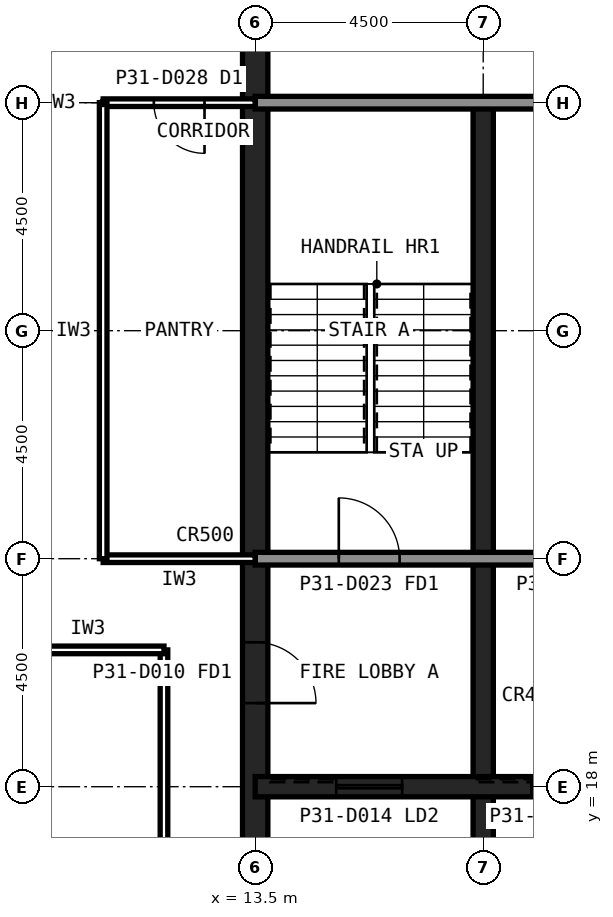
"""IFC4 building model, lengths in metres.
Left out: names, types, materials, properties, quantities, classifications, styles, units other than length and angle.
Written with IfcOpenShell. Run it as: python <this file> out.ifc"""

import sys

from ifc_helpers import new_model, si_unit, direction, frame, frame_2d, origin, place, context, subcontext, project, spatial, rectangle, extrude, element, fill, save


model = new_model("IFC4")
c1 = context("Model", 3, precision=1e-05, world=origin(), true_north=direction((0.0, 1.0)))
c2 = subcontext(c1, "Body", "Model", "MODEL_VIEW")
j1 = project(units=[si_unit("LENGTHUNIT", "METRE"), si_unit("PLANEANGLEUNIT", "RADIAN")], contexts=[c1])
p1 = place(None, origin())
s1 = spatial("IfcSite", under=j1, at=p1, CompositionType="ELEMENT")
p2 = place(p1, origin())
s2 = spatial("IfcBuilding", under=s1, at=p2, CompositionType="ELEMENT")
p3 = place(p2, frame((0.0, 0.0, 135.6)))
s3 = spatial("IfcBuildingStorey", under=s2, at=p3, CompositionType="ELEMENT", Elevation=135.6)
p4 = place(p3, frame((13.5, 40.5, 0.0), z_axis=(0.0, 0.0, 1.0), x_axis=(0.0, -1.0, 0.0)))
e1 = element("IfcWall", 1, at=p4, inside=s3, PredefinedType="SHEAR", context=c2, shape_type="SweptSolid", body=[
    extrude(rectangle(XDim=27.0, YDim=0.5, at=frame_2d((13.5, 0.0))), origin(), (0.0, 0.0, 1.0), 4.0),
])
p5 = place(p4, frame((19.65, 0.0, 0.0)))
e2 = element("IfcOpeningElement", 2, at=p5, cuts=e1, PredefinedType="OPENING", context=c2, shape_type="SweptSolid", body=[
    extrude(rectangle(XDim=1.2, YDim=2.1, at=frame_2d((0.6, 1.05))), frame((0.0, 0.26, 0.0), z_axis=(0.0, -1.0, 0.0), x_axis=(1.0, 0.0, 0.0)), (0.0, 0.0, 1.0), 0.52),
])
p6 = place(p4, frame((5.85, 0.0, 0.0)))
e3 = element("IfcOpeningElement", 3, at=p6, cuts=e1, PredefinedType="OPENING", context=c2, shape_type="SweptSolid", body=[
    extrude(rectangle(XDim=1.8, YDim=2.1, at=frame_2d((0.9, 1.05))), frame((0.0, 0.26, 0.0), z_axis=(0.0, -1.0, 0.0), x_axis=(1.0, 0.0, 0.0)), (0.0, 0.0, 1.0), 0.52),
])
p7 = place(p3, frame((18.0, 13.5, 0.0), z_axis=(0.0, 0.0, 1.0), x_axis=(0.0, 1.0, 0.0)))
e4 = element("IfcWall", 4, at=p7, inside=s3, PredefinedType="SHEAR", context=c2, shape_type="SweptSolid", body=[
    extrude(rectangle(XDim=18.0, YDim=0.4, at=frame_2d((9.0, 0.0))), origin(), (0.0, 0.0, 1.0), 4.0),
])
p8 = place(p3, frame((13.5, 18.0, 0.0), z_axis=(0.0, 0.0, 1.0), x_axis=(1.0, 0.0, 0.0)))
e5 = element("IfcWall", 5, at=p8, inside=s3, PredefinedType="SHEAR", context=c2, shape_type="SweptSolid", body=[
    extrude(rectangle(XDim=27.0, YDim=0.4, at=frame_2d((13.5, 0.0))), origin(), (0.0, 0.0, 1.0), 4.0),
])
p9 = place(p8, frame((24.3, 0.0, 0.0)))
e6 = element("IfcOpeningElement", 6, at=p9, cuts=e5, PredefinedType="OPENING", context=c2, shape_type="SweptSolid", body=[
    extrude(rectangle(XDim=0.9, YDim=2.1, at=frame_2d((0.45, 1.05))), frame((0.0, 0.21, 0.0), z_axis=(0.0, -1.0, 0.0), x_axis=(1.0, 0.0, 0.0)), (0.0, 0.0, 1.0), 0.42),
])
p10 = place(p8, frame((5.45, 0.0, 0.0)))
e7 = element("IfcOpeningElement", 7, at=p10, cuts=e5, PredefinedType="OPENING", context=c2, shape_type="SweptSolid", body=[
    extrude(rectangle(XDim=1.1, YDim=2.1, at=frame_2d((0.55, 1.05))), frame((0.0, 0.21, 0.0), z_axis=(0.0, -1.0, 0.0), x_axis=(1.0, 0.0, 0.0)), (0.0, 0.0, 1.0), 0.42),
])
p11 = place(p8, frame((8.45, 0.0, 0.0)))
e8 = element("IfcOpeningElement", 8, at=p11, cuts=e5, PredefinedType="OPENING", context=c2, shape_type="SweptSolid", body=[
    extrude(rectangle(XDim=1.1, YDim=2.1, at=frame_2d((0.55, 1.05))), frame((0.0, 0.21, 0.0), z_axis=(0.0, -1.0, 0.0), x_axis=(1.0, 0.0, 0.0)), (0.0, 0.0, 1.0), 0.42),
])
p12 = place(p8, frame((11.45, 0.0, 0.0)))
e9 = element("IfcOpeningElement", 9, at=p12, cuts=e5, PredefinedType="OPENING", context=c2, shape_type="SweptSolid", body=[
    extrude(rectangle(XDim=1.1, YDim=2.1, at=frame_2d((0.55, 1.05))), frame((0.0, 0.21, 0.0), z_axis=(0.0, -1.0, 0.0), x_axis=(1.0, 0.0, 0.0)), (0.0, 0.0, 1.0), 0.42),
])
p13 = place(p8, frame((14.45, 0.0, 0.0)))
e10 = element("IfcOpeningElement", 10, at=p13, cuts=e5, PredefinedType="OPENING", context=c2, shape_type="SweptSolid", body=[
    extrude(rectangle(XDim=1.1, YDim=2.1, at=frame_2d((0.55, 1.05))), frame((0.0, 0.21, 0.0), z_axis=(0.0, -1.0, 0.0), x_axis=(1.0, 0.0, 0.0)), (0.0, 0.0, 1.0), 0.42),
])
p14 = place(p8, frame((17.45, 0.0, 0.0)))
e11 = element("IfcOpeningElement", 11, at=p14, cuts=e5, PredefinedType="OPENING", context=c2, shape_type="SweptSolid", body=[
    extrude(rectangle(XDim=1.1, YDim=2.1, at=frame_2d((0.55, 1.05))), frame((0.0, 0.21, 0.0), z_axis=(0.0, -1.0, 0.0), x_axis=(1.0, 0.0, 0.0)), (0.0, 0.0, 1.0), 0.42),
])
p15 = place(p8, frame((20.45, 0.0, 0.0)))
e12 = element("IfcOpeningElement", 12, at=p15, cuts=e5, PredefinedType="OPENING", context=c2, shape_type="SweptSolid", body=[
    extrude(rectangle(XDim=1.1, YDim=2.1, at=frame_2d((0.55, 1.05))), frame((0.0, 0.21, 0.0), z_axis=(0.0, -1.0, 0.0), x_axis=(1.0, 0.0, 0.0)), (0.0, 0.0, 1.0), 0.42),
])
p16 = place(p8, frame((1.6, 0.0, 0.0)))
e13 = element("IfcOpeningElement", 13, at=p16, cuts=e5, PredefinedType="OPENING", context=c2, shape_type="SweptSolid", body=[
    extrude(rectangle(XDim=1.3, YDim=2.2, at=frame_2d((0.65, 1.1))), frame((0.0, 0.21, 0.0), z_axis=(0.0, -1.0, 0.0), x_axis=(1.0, 0.0, 0.0)), (0.0, 0.0, 1.0), 0.42),
])
p17 = place(p3, frame((13.5, 22.5, 0.0), z_axis=(0.0, 0.0, 1.0), x_axis=(1.0, 0.0, 0.0)))
e14 = element("IfcWall", 14, at=p17, inside=s3, PredefinedType="SOLIDWALL", context=c2, shape_type="SweptSolid", body=[
    extrude(rectangle(XDim=27.0, YDim=0.25, at=frame_2d((13.5, 0.0))), origin(), (0.0, 0.0, 1.0), 3.84),
])
p18 = place(p17, frame((1.65, 0.0, 0.0)))
e15 = element("IfcOpeningElement", 15, at=p18, cuts=e14, PredefinedType="OPENING", context=c2, shape_type="SweptSolid", body=[
    extrude(rectangle(XDim=1.2, YDim=2.1, at=frame_2d((0.6, 1.05))), frame((0.0, 0.135, 0.0), z_axis=(0.0, -1.0, 0.0), x_axis=(1.0, 0.0, 0.0)), (0.0, 0.0, 1.0), 0.27),
])
p19 = place(p17, frame((6.025, 0.0, 0.0)))
e16 = element("IfcOpeningElement", 16, at=p19, cuts=e14, PredefinedType="OPENING", context=c2, shape_type="SweptSolid", body=[
    extrude(rectangle(XDim=1.0, YDim=2.1, at=frame_2d((0.5, 1.05))), frame((0.0, 0.135, 0.0), z_axis=(0.0, -1.0, 0.0), x_axis=(1.0, 0.0, 0.0)), (0.0, 0.0, 1.0), 0.27),
])
p20 = place(p17, frame((10.525, 0.0, 0.0)))
e17 = element("IfcOpeningElement", 17, at=p20, cuts=e14, PredefinedType="OPENING", context=c2, shape_type="SweptSolid", body=[
    extrude(rectangle(XDim=1.0, YDim=2.1, at=frame_2d((0.5, 1.05))), frame((0.0, 0.135, 0.0), z_axis=(0.0, -1.0, 0.0), x_axis=(1.0, 0.0, 0.0)), (0.0, 0.0, 1.0), 0.27),
])
p21 = place(p17, frame((19.75, 0.0, 0.0)))
e18 = element("IfcOpeningElement", 18, at=p21, cuts=e14, PredefinedType="OPENING", context=c2, shape_type="SweptSolid", body=[
    extrude(rectangle(XDim=1.0, YDim=2.1, at=frame_2d((0.5, 1.05))), frame((0.0, 0.135, 0.0), z_axis=(0.0, -1.0, 0.0), x_axis=(1.0, 0.0, 0.0)), (0.0, 0.0, 1.0), 0.27),
])
p22 = place(p17, frame((15.05, 0.0, 0.0)))
e19 = element("IfcOpeningElement", 19, at=p22, cuts=e14, PredefinedType="OPENING", context=c2, shape_type="SweptSolid", body=[
    extrude(rectangle(XDim=1.4, YDim=2.4, at=frame_2d((0.7, 1.2))), frame((0.0, 0.135, 0.0), z_axis=(0.0, -1.0, 0.0), x_axis=(1.0, 0.0, 0.0)), (0.0, 0.0, 1.0), 0.27),
])
p23 = place(p3, frame((13.5, 31.5, 0.0), z_axis=(0.0, 0.0, 1.0), x_axis=(1.0, 0.0, 0.0)))
e20 = element("IfcWall", 20, at=p23, inside=s3, PredefinedType="SOLIDWALL", context=c2, shape_type="SweptSolid", body=[
    extrude(rectangle(XDim=27.0, YDim=0.25, at=frame_2d((13.5, 0.0))), origin(), (0.0, 0.0, 1.0), 3.84),
])
p24 = place(p23, frame((24.15, 0.0, 0.0)))
e21 = element("IfcOpeningElement", 21, at=p24, cuts=e20, PredefinedType="OPENING", context=c2, shape_type="SweptSolid", body=[
    extrude(rectangle(XDim=1.2, YDim=2.1, at=frame_2d((0.6, 1.05))), frame((0.0, 0.135, 0.0), z_axis=(0.0, -1.0, 0.0), x_axis=(1.0, 0.0, 0.0)), (0.0, 0.0, 1.0), 0.27),
])
p25 = place(p23, frame((15.3, 0.0, 0.0)))
e22 = element("IfcOpeningElement", 22, at=p25, cuts=e20, PredefinedType="OPENING", context=c2, shape_type="SweptSolid", body=[
    extrude(rectangle(XDim=0.9, YDim=2.1, at=frame_2d((0.45, 1.05))), frame((0.0, 0.135, 0.0), z_axis=(0.0, -1.0, 0.0), x_axis=(1.0, 0.0, 0.0)), (0.0, 0.0, 1.0), 0.27),
])
p26 = place(p23, frame((19.8, 0.0, 0.0)))
e23 = element("IfcOpeningElement", 23, at=p26, cuts=e20, PredefinedType="OPENING", context=c2, shape_type="SweptSolid", body=[
    extrude(rectangle(XDim=0.9, YDim=2.1, at=frame_2d((0.45, 1.05))), frame((0.0, 0.135, 0.0), z_axis=(0.0, -1.0, 0.0), x_axis=(1.0, 0.0, 0.0)), (0.0, 0.0, 1.0), 0.27),
])
p27 = place(p3, frame((11.7, 20.7, 0.0), z_axis=(0.0, 0.0, 1.0), x_axis=(0.0, -1.0, 0.0)))
e24 = element("IfcWall", 24, at=p27, inside=s3, PredefinedType="PARTITIONING", context=c2, shape_type="SweptSolid", body=[
    extrude(rectangle(XDim=13.5, YDim=0.15, at=frame_2d((6.75, 0.0))), origin(), (0.0, 0.0, 1.0), 3.84),
])
p28 = place(p27, frame((6.25, 0.0, 0.0)))
e25 = element("IfcOpeningElement", 25, at=p28, cuts=e24, PredefinedType="OPENING", context=c2, shape_type="SweptSolid", body=[
    extrude(rectangle(XDim=1.0, YDim=2.1, at=frame_2d((0.5, 1.05))), frame((0.0, 0.085, 0.0), z_axis=(0.0, -1.0, 0.0), x_axis=(1.0, 0.0, 0.0)), (0.0, 0.0, 1.0), 0.17),
])
p29 = place(p3, frame((8.7, 20.7, 0.0), z_axis=(0.0, 0.0, 1.0), x_axis=(1.0, 0.0, 0.0)))
e26 = element("IfcWall", 26, at=p29, inside=s3, PredefinedType="PARTITIONING", context=c2, shape_type="SweptSolid", body=[
    extrude(rectangle(XDim=3.0, YDim=0.15, at=frame_2d((1.5, 0.0))), origin(), (0.0, 0.0, 1.0), 3.84),
])
p30 = place(p3, frame((10.5, 22.5, 0.0), z_axis=(0.0, 0.0, 1.0), x_axis=(1.0, 0.0, 0.0)))
e27 = element("IfcWall", 27, at=p30, inside=s3, PredefinedType="PARTITIONING", context=c2, shape_type="SweptSolid", body=[
    extrude(rectangle(XDim=3.0, YDim=0.15, at=frame_2d((1.5, 0.0))), origin(), (0.0, 0.0, 1.0), 2.989),
])
p31 = place(p3, frame((13.5, 31.5, 0.0), z_axis=(0.0, 0.0, 1.0), x_axis=(-1.0, 0.0, 0.0)))
e28 = element("IfcWall", 28, at=p31, inside=s3, PredefinedType="PARTITIONING", context=c2, shape_type="SweptSolid", body=[
    extrude(rectangle(XDim=3.0, YDim=0.15, at=frame_2d((1.5, 0.0))), origin(), (0.0, 0.0, 1.0), 2.989),
])
p32 = place(p31, frame((1.0, 0.0, 0.0)))
e29 = element("IfcOpeningElement", 29, at=p32, cuts=e28, PredefinedType="OPENING", context=c2, shape_type="SweptSolid", body=[
    extrude(rectangle(XDim=1.0, YDim=2.1, at=frame_2d((0.5, 1.05))), frame((0.0, 0.085, 0.0), z_axis=(0.0, -1.0, 0.0), x_axis=(1.0, 0.0, 0.0)), (0.0, 0.0, 1.0), 0.17),
])
p33 = place(p3, frame((10.5, 31.5, 0.0), z_axis=(0.0, 0.0, 1.0), x_axis=(0.0, -1.0, 0.0)))
e30 = element("IfcWall", 30, at=p33, inside=s3, PredefinedType="PARTITIONING", context=c2, shape_type="SweptSolid", body=[
    extrude(rectangle(XDim=9.0, YDim=0.15, at=frame_2d((4.5, 0.0))), origin(), (0.0, 0.0, 1.0), 3.84),
])
p34 = place(p5, origin())
e31 = element("IfcDoor", 31, at=p34, inside=s3, OperationType="SINGLE_SWING_RIGHT", PredefinedType="DOOR", context=c2, shape_type="SweptSolid", body=[
    extrude(rectangle(XDim=1.2, YDim=2.1, at=frame_2d((0.6, 1.05))), frame((0.0, 0.025, 0.0), z_axis=(0.0, -1.0, 0.0), x_axis=(1.0, 0.0, 0.0)), (0.0, 0.0, 1.0), 0.05),
])
fill(e2, e31)
p35 = place(p18, origin())
e32 = element("IfcDoor", 32, at=p35, inside=s3, OperationType="SINGLE_SWING_LEFT", PredefinedType="DOOR", context=c2, shape_type="SweptSolid", body=[
    extrude(rectangle(XDim=1.2, YDim=2.1, at=frame_2d((0.6, 1.05))), frame((0.0, 0.025, 0.0), z_axis=(0.0, -1.0, 0.0), x_axis=(1.0, 0.0, 0.0)), (0.0, 0.0, 1.0), 0.05),
])
fill(e15, e32)
p36 = place(p10, origin())
e33 = element("IfcDoor", 33, at=p36, inside=s3, OperationType="SLIDING_TO_LEFT", PredefinedType="DOOR", context=c2, shape_type="SweptSolid", body=[
    extrude(rectangle(XDim=1.1, YDim=2.1, at=frame_2d((0.55, 1.05))), frame((0.0, 0.025, 0.0), z_axis=(0.0, -1.0, 0.0), x_axis=(1.0, 0.0, 0.0)), (0.0, 0.0, 1.0), 0.05),
])
fill(e7, e33)
p37 = place(p16, origin())
e34 = element("IfcDoor", 34, at=p37, inside=s3, OperationType="SLIDING_TO_LEFT", PredefinedType="DOOR", context=c2, shape_type="SweptSolid", body=[
    extrude(rectangle(XDim=1.3, YDim=2.2, at=frame_2d((0.65, 1.1))), frame((0.0, 0.025, 0.0), z_axis=(0.0, -1.0, 0.0), x_axis=(1.0, 0.0, 0.0)), (0.0, 0.0, 1.0), 0.05),
])
fill(e13, e34)
p38 = place(p32, origin())
e35 = element("IfcDoor", 35, at=p38, inside=s3, OperationType="SINGLE_SWING_LEFT", PredefinedType="DOOR", context=c2, shape_type="SweptSolid", body=[
    extrude(rectangle(XDim=1.0, YDim=2.1, at=frame_2d((0.5, 1.05))), frame((0.0, 0.025, 0.0), z_axis=(0.0, -1.0, 0.0), x_axis=(1.0, 0.0, 0.0)), (0.0, 0.0, 1.0), 0.05),
])
fill(e29, e35)
save(model, sys.argv[1])
